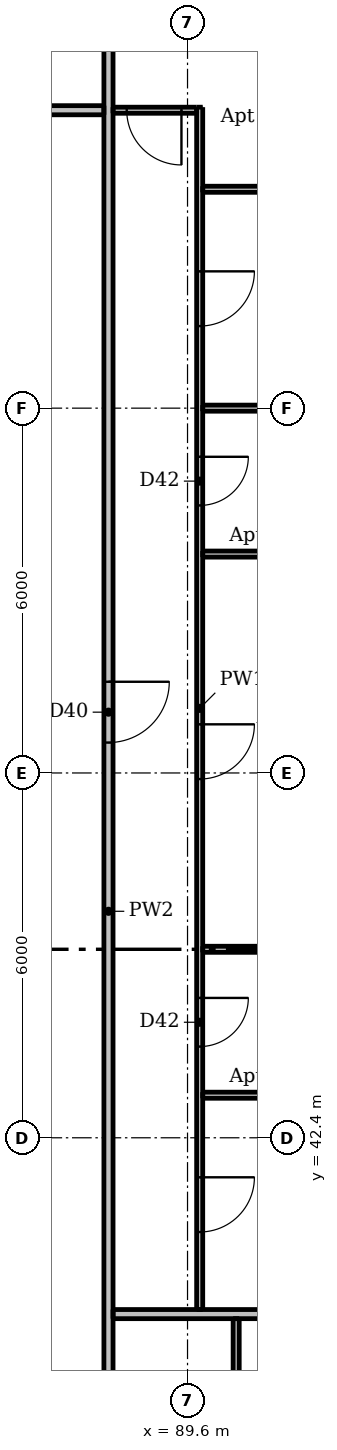
"""IFC4 building model, lengths in metres.
Left out: names, types, materials, properties, quantities, classifications, styles, units other than length and angle.
Written with IfcOpenShell. Run it as: python <this file> out.ifc"""

import sys

from ifc_helpers import new_model, si_unit, direction, frame, frame_2d, origin, place, context, subcontext, project, spatial, rectangle, extrude, element, fill, save


model = new_model("IFC4")
c1 = context("Model", 3, precision=1e-05, world=origin(), true_north=direction((0.0, 1.0)))
c2 = subcontext(c1, "Body", "Model", "MODEL_VIEW")
j1 = project(units=[si_unit("LENGTHUNIT", "METRE"), si_unit("PLANEANGLEUNIT", "RADIAN")], contexts=[c1])
p1 = place(None, origin())
s1 = spatial("IfcSite", under=j1, at=p1, CompositionType="ELEMENT")
p2 = place(p1, origin())
s2 = spatial("IfcBuilding", under=s1, at=p2, CompositionType="ELEMENT")
p3 = place(p2, frame((0.0, 0.0, 140.5)))
s3 = spatial("IfcBuildingStorey", under=s2, at=p3, CompositionType="ELEMENT", Elevation=140.5)
p4 = place(p3, frame((89.8, 59.35, 0.0), z_axis=(0.0, 0.0, 1.0), x_axis=(0.0, -1.0, 0.0)))
e1 = element("IfcWall", 1, at=p4, inside=s3, PredefinedType="PARTITIONING", context=c2, shape_type="SweptSolid", body=[
    extrude(rectangle(XDim=19.775, YDim=0.1, at=frame_2d((9.888, 0.0))), origin(), (0.0, 0.0, 1.0), 3.05),
])
p5 = place(p4, frame((2.7, 0.0, 0.0)))
e2 = element("IfcOpeningElement", 2, at=p5, cuts=e1, PredefinedType="OPENING", context=c2, shape_type="SweptSolid", body=[
    extrude(rectangle(XDim=0.9, YDim=2.1, at=frame_2d((0.45, 1.05))), frame((0.0, 0.06, 0.0), z_axis=(0.0, -1.0, 0.0), x_axis=(1.0, 0.0, 0.0)), (0.0, 0.0, 1.0), 0.12),
])
p6 = place(p4, frame((17.6, 0.0, 0.0)))
e3 = element("IfcOpeningElement", 3, at=p6, cuts=e1, PredefinedType="OPENING", context=c2, shape_type="SweptSolid", body=[
    extrude(rectangle(XDim=0.9, YDim=2.1, at=frame_2d((0.45, 1.05))), frame((0.0, 0.06, 0.0), z_axis=(0.0, -1.0, 0.0), x_axis=(1.0, 0.0, 0.0)), (0.0, 0.0, 1.0), 0.12),
])
p7 = place(p4, frame((10.15, 0.0, 0.0)))
e4 = element("IfcOpeningElement", 4, at=p7, cuts=e1, PredefinedType="OPENING", context=c2, shape_type="SweptSolid", body=[
    extrude(rectangle(XDim=0.9, YDim=2.1, at=frame_2d((0.45, 1.05))), frame((0.0, 0.06, 0.0), z_axis=(0.0, -1.0, 0.0), x_axis=(1.0, 0.0, 0.0)), (0.0, 0.0, 1.0), 0.12),
])
p8 = place(p4, frame((14.65, 0.0, 0.0)))
e5 = element("IfcOpeningElement", 5, at=p8, cuts=e1, PredefinedType="OPENING", context=c2, shape_type="SweptSolid", body=[
    extrude(rectangle(XDim=0.8, YDim=2.1, at=frame_2d((0.4, 1.05))), frame((0.0, 0.06, 0.0), z_axis=(0.0, -1.0, 0.0), x_axis=(1.0, 0.0, 0.0)), (0.0, 0.0, 1.0), 0.12),
])
p9 = place(p4, frame((5.75, 0.0, 0.0)))
e6 = element("IfcOpeningElement", 6, at=p9, cuts=e1, PredefinedType="OPENING", context=c2, shape_type="SweptSolid", body=[
    extrude(rectangle(XDim=0.8, YDim=2.1, at=frame_2d((0.4, 1.05))), frame((0.0, 0.06, 0.0), z_axis=(0.0, -1.0, 0.0), x_axis=(1.0, 0.0, 0.0)), (0.0, 0.0, 1.0), 0.12),
])
p10 = place(p3, frame((90.4, 33.45, 0.0), z_axis=(0.0, 0.0, 1.0), x_axis=(0.0, 1.0, 0.0)))
e7 = element("IfcWall", 7, at=p10, inside=s3, PredefinedType="PARTITIONING", context=c2, shape_type="SweptSolid", body=[
    extrude(rectangle(XDim=5.975, YDim=0.1, at=frame_2d((2.988, 0.0))), origin(), (0.0, 0.0, 1.0), 3.05),
])
p11 = place(p10, frame((3.8, 0.0, 0.0)))
e8 = element("IfcOpeningElement", 8, at=p11, cuts=e7, PredefinedType="OPENING", context=c2, shape_type="SweptSolid", body=[
    extrude(rectangle(XDim=0.8, YDim=2.1, at=frame_2d((0.4, 1.05))), frame((0.0, 0.06, 0.0), z_axis=(0.0, -1.0, 0.0), x_axis=(1.0, 0.0, 0.0)), (0.0, 0.0, 1.0), 0.12),
])
p12 = place(p3, frame((89.75, 59.3, 0.0), z_axis=(0.0, 0.0, 1.0), x_axis=(-1.0, 0.0, 0.0)))
e9 = element("IfcWall", 9, at=p12, inside=s3, PredefinedType="PARTITIONING", context=c2, shape_type="SweptSolid", body=[
    extrude(rectangle(XDim=1.375, YDim=0.1, at=frame_2d((0.688, 0.0))), origin(), (0.0, 0.0, 1.0), 3.05),
])
p13 = place(p12, frame((0.25, 0.0, 0.0)))
e10 = element("IfcOpeningElement", 10, at=p13, cuts=e9, PredefinedType="OPENING", context=c2, shape_type="SweptSolid", body=[
    extrude(rectangle(XDim=0.9, YDim=2.1, at=frame_2d((0.45, 1.05))), frame((0.0, 0.06, 0.0), z_axis=(0.0, -1.0, 0.0), x_axis=(1.0, 0.0, 0.0)), (0.0, 0.0, 1.0), 0.12),
])
p14 = place(p3, frame((89.85, 58.0, 0.0), z_axis=(0.0, 0.0, 1.0), x_axis=(1.0, 0.0, 0.0)))
e11 = element("IfcWall", 11, at=p14, inside=s3, PredefinedType="PARTITIONING", context=c2, shape_type="SweptSolid", body=[
    extrude(rectangle(XDim=3.5, YDim=0.1, at=frame_2d((1.75, 0.0))), origin(), (0.0, 0.0, 1.0), 3.05),
])
p15 = place(p3, frame((89.85, 54.4, 0.0), z_axis=(0.0, 0.0, 1.0), x_axis=(1.0, 0.0, 0.0)))
e12 = element("IfcWall", 12, at=p15, inside=s3, PredefinedType="PARTITIONING", context=c2, shape_type="SweptSolid", body=[
    extrude(rectangle(XDim=7.65, YDim=0.1, at=frame_2d((3.825, 0.0))), origin(), (0.0, 0.0, 1.0), 2.516),
])
p16 = place(p3, frame((89.85, 52.0, 0.0), z_axis=(0.0, 0.0, 1.0), x_axis=(1.0, 0.0, 0.0)))
e13 = element("IfcWall", 13, at=p16, inside=s3, PredefinedType="PARTITIONING", context=c2, shape_type="SweptSolid", body=[
    extrude(rectangle(XDim=3.5, YDim=0.1, at=frame_2d((1.75, 0.0))), origin(), (0.0, 0.0, 1.0), 3.05),
])
p17 = place(p3, frame((89.85, 45.5, 0.0), z_axis=(0.0, 0.0, 1.0), x_axis=(1.0, 0.0, 0.0)))
e14 = element("IfcWall", 14, at=p17, inside=s3, PredefinedType="PARTITIONING", context=c2, shape_type="SweptSolid", body=[
    extrude(rectangle(XDim=6.15, YDim=0.1, at=frame_2d((3.075, 0.0))), origin(), (0.0, 0.0, 1.0), 3.05),
])
p18 = place(p3, frame((89.85, 43.1, 0.0), z_axis=(0.0, 0.0, 1.0), x_axis=(1.0, 0.0, 0.0)))
e15 = element("IfcWall", 15, at=p18, inside=s3, PredefinedType="PARTITIONING", context=c2, shape_type="SweptSolid", body=[
    extrude(rectangle(XDim=3.5, YDim=0.1, at=frame_2d((1.75, 0.0))), origin(), (0.0, 0.0, 1.0), 3.05),
])
p19 = place(p3, frame((88.3, 60.475, 0.0), z_axis=(0.0, 0.0, 1.0), x_axis=(0.0, -1.0, 0.0)))
e16 = element("IfcWall", 16, at=p19, inside=s3, PredefinedType="PARTITIONING", context=c2, shape_type="SweptSolid", body=[
    extrude(rectangle(XDim=28.7, YDim=0.15, at=frame_2d((14.35, 0.0))), origin(), (0.0, 0.0, 1.0), 3.05),
])
p20 = place(p19, frame((27.425, 0.0, 0.0)))
e17 = element("IfcOpeningElement", 17, at=p20, cuts=e16, PredefinedType="OPENING", context=c2, shape_type="SweptSolid", body=[
    extrude(rectangle(XDim=1.0, YDim=2.1, at=frame_2d((0.5, 1.05))), frame((0.0, 0.085, 0.0), z_axis=(0.0, -1.0, 0.0), x_axis=(1.0, 0.0, 0.0)), (0.0, 0.0, 1.0), 0.17),
])
p21 = place(p19, frame((10.575, 0.0, 0.0)))
e18 = element("IfcOpeningElement", 18, at=p21, cuts=e16, PredefinedType="OPENING", context=c2, shape_type="SweptSolid", body=[
    extrude(rectangle(XDim=1.0, YDim=2.1, at=frame_2d((0.5, 1.05))), frame((0.0, 0.085, 0.0), z_axis=(0.0, -1.0, 0.0), x_axis=(1.0, 0.0, 0.0)), (0.0, 0.0, 1.0), 0.17),
])
p22 = place(p3, frame((59.675, 59.3, 0.0), z_axis=(0.0, 0.0, 1.0), x_axis=(1.0, 0.0, 0.0)))
e19 = element("IfcWall", 19, at=p22, inside=s3, PredefinedType="PARTITIONING", context=c2, shape_type="SweptSolid", body=[
    extrude(rectangle(XDim=28.55, YDim=0.15, at=frame_2d((14.275, 0.0))), origin(), (0.0, 0.0, 1.0), 3.05),
])
p23 = place(p22, frame((8.975, 0.0, 0.0)))
e20 = element("IfcOpeningElement", 20, at=p23, cuts=e19, PredefinedType="OPENING", context=c2, shape_type="SweptSolid", body=[
    extrude(rectangle(XDim=1.0, YDim=2.1, at=frame_2d((0.5, 1.05))), frame((0.0, 0.085, 0.0), z_axis=(0.0, -1.0, 0.0), x_axis=(1.0, 0.0, 0.0)), (0.0, 0.0, 1.0), 0.17),
])
p24 = place(p22, frame((25.775, 0.0, 0.0)))
e21 = element("IfcOpeningElement", 21, at=p24, cuts=e19, PredefinedType="OPENING", context=c2, shape_type="SweptSolid", body=[
    extrude(rectangle(XDim=1.0, YDim=2.1, at=frame_2d((0.5, 1.05))), frame((0.0, 0.085, 0.0), z_axis=(0.0, -1.0, 0.0), x_axis=(1.0, 0.0, 0.0)), (0.0, 0.0, 1.0), 0.17),
])
p25 = place(p3, frame((88.375, 39.5, 0.0), z_axis=(0.0, 0.0, 1.0), x_axis=(1.0, 0.0, 0.0)))
e22 = element("IfcWall", 22, at=p25, inside=s3, PredefinedType="PARTITIONING", context=c2, shape_type="SweptSolid", body=[
    extrude(rectangle(XDim=7.625, YDim=0.15, at=frame_2d((3.812, 0.0))), origin(), (0.0, 0.0, 1.0), 3.05),
])
p26 = place(p21, origin())
e23 = element("IfcDoor", 23, at=p26, inside=s3, OperationType="SINGLE_SWING_LEFT", PredefinedType="DOOR", context=c2, shape_type="SweptSolid", body=[
    extrude(rectangle(XDim=1.0, YDim=2.1, at=frame_2d((0.5, 1.05))), frame((0.0, 0.025, 0.0), z_axis=(0.0, -1.0, 0.0), x_axis=(1.0, 0.0, 0.0)), (0.0, 0.0, 1.0), 0.05),
])
fill(e18, e23)
p27 = place(p5, origin())
e24 = element("IfcDoor", 24, at=p27, inside=s3, OperationType="SINGLE_SWING_LEFT", PredefinedType="DOOR", context=c2, shape_type="SweptSolid", body=[
    extrude(rectangle(XDim=0.9, YDim=2.1, at=frame_2d((0.45, 1.05))), frame((0.0, 0.025, 0.0), z_axis=(0.0, -1.0, 0.0), x_axis=(1.0, 0.0, 0.0)), (0.0, 0.0, 1.0), 0.05),
])
fill(e2, e24)
p28 = place(p13, origin())
e25 = element("IfcDoor", 25, at=p28, inside=s3, OperationType="SINGLE_SWING_LEFT", PredefinedType="DOOR", context=c2, shape_type="SweptSolid", body=[
    extrude(rectangle(XDim=0.9, YDim=2.1, at=frame_2d((0.45, 1.05))), frame((0.0, 0.025, 0.0), z_axis=(0.0, -1.0, 0.0), x_axis=(1.0, 0.0, 0.0)), (0.0, 0.0, 1.0), 0.05),
])
fill(e10, e25)
p29 = place(p6, origin())
e26 = element("IfcDoor", 26, at=p29, inside=s3, OperationType="SINGLE_SWING_LEFT", PredefinedType="DOOR", context=c2, shape_type="SweptSolid", body=[
    extrude(rectangle(XDim=0.9, YDim=2.1, at=frame_2d((0.45, 1.05))), frame((0.0, 0.025, 0.0), z_axis=(0.0, -1.0, 0.0), x_axis=(1.0, 0.0, 0.0)), (0.0, 0.0, 1.0), 0.05),
])
fill(e3, e26)
p30 = place(p7, origin())
e27 = element("IfcDoor", 27, at=p30, inside=s3, OperationType="SINGLE_SWING_LEFT", PredefinedType="DOOR", context=c2, shape_type="SweptSolid", body=[
    extrude(rectangle(XDim=0.9, YDim=2.1, at=frame_2d((0.45, 1.05))), frame((0.0, 0.025, 0.0), z_axis=(0.0, -1.0, 0.0), x_axis=(1.0, 0.0, 0.0)), (0.0, 0.0, 1.0), 0.05),
])
fill(e4, e27)
p31 = place(p8, origin())
e28 = element("IfcDoor", 28, at=p31, inside=s3, OperationType="SINGLE_SWING_LEFT", PredefinedType="DOOR", context=c2, shape_type="SweptSolid", body=[
    extrude(rectangle(XDim=0.8, YDim=2.1, at=frame_2d((0.4, 1.05))), frame((0.0, 0.025, 0.0), z_axis=(0.0, -1.0, 0.0), x_axis=(1.0, 0.0, 0.0)), (0.0, 0.0, 1.0), 0.05),
])
fill(e5, e28)
p32 = place(p9, origin())
e29 = element("IfcDoor", 29, at=p32, inside=s3, OperationType="SINGLE_SWING_LEFT", PredefinedType="DOOR", context=c2, shape_type="SweptSolid", body=[
    extrude(rectangle(XDim=0.8, YDim=2.1, at=frame_2d((0.4, 1.05))), frame((0.0, 0.025, 0.0), z_axis=(0.0, -1.0, 0.0), x_axis=(1.0, 0.0, 0.0)), (0.0, 0.0, 1.0), 0.05),
])
fill(e6, e29)
save(model, sys.argv[1])
